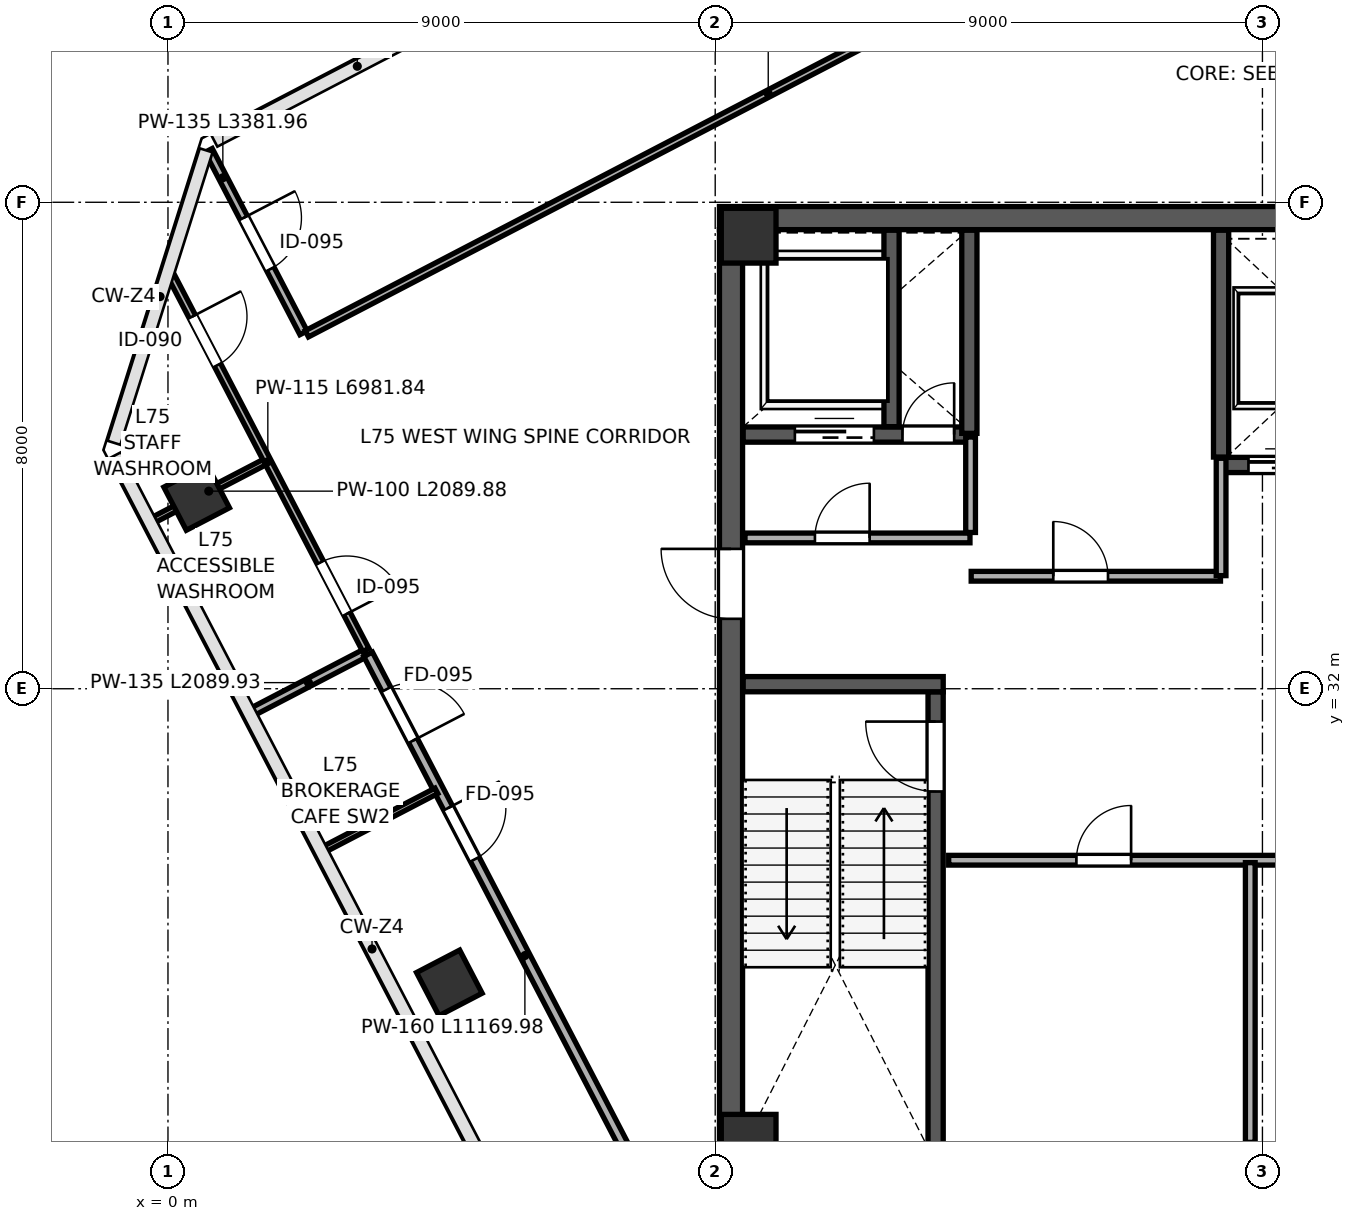
"""IFC4 building model, lengths in metres.
Left out: names, types, materials, properties, quantities, classifications, styles, units other than length and angle.
Written with IfcOpenShell. Run it as: python <this file> out.ifc"""

import sys

from ifc_helpers import new_model, si_unit, direction, frame, frame_2d, origin, origin_2d, place, context, subcontext, project, spatial, rectangle, extrude, source, transform, mapped, element, fill, save


model = new_model("IFC4")
c1 = context("Model", 3, precision=1e-05, world=origin(), true_north=direction((0.0, 1.0)))
c2 = subcontext(c1, "Body", "Model", "MODEL_VIEW")
j1 = project(units=[si_unit("LENGTHUNIT", "METRE"), si_unit("PLANEANGLEUNIT", "RADIAN")], contexts=[c1])
p1 = place(None, origin())
s1 = spatial("IfcSite", under=j1, at=p1, CompositionType="ELEMENT")
p2 = place(p1, origin())
s2 = spatial("IfcBuilding", under=s1, at=p2, CompositionType="ELEMENT")
p3 = place(p2, frame((0.0, 0.0, 332.4)))
s3 = spatial("IfcBuildingStorey", under=s2, at=p3, CompositionType="ELEMENT", Elevation=332.4)
m1 = source(origin(), c2, "Body", "SweptSolid", [
    extrude(rectangle(XDim=0.9, YDim=0.9, at=origin_2d()), origin(), (0.0, 0.0, 1.0), 4.199),
])
for number, where, z_axis, x_axis in (
    (1, (9.55, 24.55, 0.001), (0.0, 0.0, 1.0), (1.0, 0.0, 0.0)),
    (2, (9.55, 39.45, 0.001), (0.0, 0.0, 1.0), (1.0, 0.0, 0.0)),
):
    element("IfcColumn", number, at=place(p3, frame(where, z_axis=z_axis, x_axis=x_axis)), inside=s3, PredefinedType="COLUMN", context=c2, shape_type="MappedRepresentation", body=[
        mapped(m1, transform((0.0, 0.0, 0.0), scale=1.0)),
    ])
m2 = source(origin(), c2, "Body", "SweptSolid", [
    extrude(rectangle(XDim=0.8, YDim=0.8, at=origin_2d()), origin(), (0.0, 0.0, 1.0), 4.199),
])
for number, where, z_axis, x_axis in (
    (3, (0.472, 35.146, 0.001), (0.0, 0.0, 1.0), (-0.462, 0.887, 0.0)),
    (4, (4.627, 27.163, 0.001), (0.0, 0.0, 1.0), (-0.462, 0.887, 0.0)),
):
    element("IfcColumn", number, at=place(p3, frame(where, z_axis=z_axis, x_axis=x_axis)), inside=s3, PredefinedType="COLUMN", context=c2, shape_type="MappedRepresentation", body=[
        mapped(m2, transform((0.0, 0.0, 0.0), scale=1.0)),
    ])
p4 = place(p3, frame((9.26, 24.45, 0.0), z_axis=(0.0, 0.0, 1.0), x_axis=(0.0, 1.0, 0.0)))
e5 = element("IfcWall", 5, at=p4, inside=s3, PredefinedType="SHEAR", context=c2, shape_type="SweptSolid", body=[
    extrude(rectangle(XDim=15.1, YDim=0.38, at=frame_2d((7.55, 0.0))), origin(), (0.0, 0.0, 1.0), 3.96),
])
p5 = place(p4, frame((8.7, 0.0, 0.0)))
e6 = element("IfcOpeningElement", 6, at=p5, cuts=e5, PredefinedType="OPENING", context=c2, shape_type="SweptSolid", body=[
    extrude(rectangle(XDim=1.15, YDim=2.2, at=frame_2d((0.575, 1.1))), frame((0.0, 0.2, 0.0), z_axis=(0.0, -1.0, 0.0), x_axis=(1.0, 0.0, 0.0)), (0.0, 0.0, 1.0), 0.4),
])
p6 = place(p3, frame((9.07, 39.74, 0.0), z_axis=(0.0, 0.0, 1.0), x_axis=(1.0, 0.0, 0.0)))
e7 = element("IfcWall", 7, at=p6, inside=s3, PredefinedType="SHEAR", context=c2, shape_type="SweptSolid", body=[
    extrude(rectangle(XDim=17.86, YDim=0.38, at=frame_2d((8.93, 0.0))), origin(), (0.0, 0.0, 1.0), 3.96),
])
p7 = place(p3, frame((12.625, 24.46, 0.0), z_axis=(0.0, 0.0, 1.0), x_axis=(0.0, 1.0, 0.0)))
e8 = element("IfcWall", 8, at=p7, inside=s3, PredefinedType="SHEAR", context=c2, shape_type="SweptSolid", body=[
    extrude(rectangle(XDim=7.49, YDim=0.25, at=frame_2d((3.745, 0.0))), origin(), (0.0, 0.0, 1.0), 3.96),
])
p8 = place(p7, frame((5.85, 0.0, 0.0)))
e9 = element("IfcOpeningElement", 9, at=p8, cuts=e8, PredefinedType="OPENING", context=c2, shape_type="SweptSolid", body=[
    extrude(rectangle(XDim=1.15, YDim=2.2, at=frame_2d((0.575, 1.1))), frame((0.0, 0.135, 0.0), z_axis=(0.0, -1.0, 0.0), x_axis=(1.0, 0.0, 0.0)), (0.0, 0.0, 1.0), 0.27),
])
p9 = place(p3, frame((9.46, 32.075, 0.0), z_axis=(0.0, 0.0, 1.0), x_axis=(1.0, 0.0, 0.0)))
e10 = element("IfcWall", 10, at=p9, inside=s3, PredefinedType="SHEAR", context=c2, shape_type="SweptSolid", body=[
    extrude(rectangle(XDim=3.29, YDim=0.25, at=frame_2d((1.645, 0.0))), origin(), (0.0, 0.0, 1.0), 3.96),
])
p10 = place(p3, frame((9.46, 36.18, 0.0), z_axis=(0.0, 0.0, 1.0), x_axis=(1.0, 0.0, 0.0)))
e11 = element("IfcWall", 11, at=p10, inside=s3, PredefinedType="SHEAR", context=c2, shape_type="SweptSolid", body=[
    extrude(rectangle(XDim=3.79, YDim=0.25, at=frame_2d((1.895, 0.0))), origin(), (0.0, 0.0, 1.0), 3.96),
])
p11 = place(p10, frame((2.62, 0.0, 0.0)))
e12 = element("IfcOpeningElement", 12, at=p11, cuts=e11, PredefinedType="OPENING", context=c2, shape_type="SweptSolid", body=[
    extrude(rectangle(XDim=0.85, YDim=2.1, at=frame_2d((0.425, 1.05))), frame((0.0, 0.135, 0.0), z_axis=(0.0, -1.0, 0.0), x_axis=(1.0, 0.0, 0.0)), (0.0, 0.0, 1.0), 0.27),
])
p12 = place(p10, frame((0.85, 0.0, 0.0)))
e13 = element("IfcOpeningElement", 13, at=p12, cuts=e11, PredefinedType="OPENING", context=c2, shape_type="SweptSolid", body=[
    extrude(rectangle(XDim=1.3, YDim=2.25, at=frame_2d((0.65, 1.125))), frame((0.0, 0.135, 0.0), z_axis=(0.0, -1.0, 0.0), x_axis=(1.0, 0.0, 0.0)), (0.0, 0.0, 1.0), 0.27),
])
p13 = place(p3, frame((11.9, 36.31, 0.0), z_axis=(0.0, 0.0, 1.0), x_axis=(0.0, 1.0, 0.0)))
e14 = element("IfcWall", 14, at=p13, inside=s3, PredefinedType="SHEAR", context=c2, shape_type="SweptSolid", body=[
    extrude(rectangle(XDim=3.23, YDim=0.25, at=frame_2d((1.615, 0.0))), origin(), (0.0, 0.0, 1.0), 3.96),
])
p14 = place(p3, frame((13.18, 36.2, 0.0), z_axis=(0.0, 0.0, 1.0), x_axis=(0.0, 1.0, 0.0)))
e15 = element("IfcWall", 15, at=p14, inside=s3, PredefinedType="SHEAR", context=c2, shape_type="SweptSolid", body=[
    extrude(rectangle(XDim=3.34, YDim=0.25, at=frame_2d((1.67, 0.0))), origin(), (0.0, 0.0, 1.0), 3.96),
])
p15 = place(p3, frame((17.32, 35.68, 0.0), z_axis=(0.0, 0.0, 1.0), x_axis=(1.0, 0.0, 0.0)))
e16 = element("IfcWall", 16, at=p15, inside=s3, PredefinedType="SHEAR", context=c2, shape_type="SweptSolid", body=[
    extrude(rectangle(XDim=3.87, YDim=0.25, at=frame_2d((1.935, 0.0))), origin(), (0.0, 0.0, 1.0), 3.96),
])
p16 = place(p15, frame((0.45, 0.0, 0.0)))
e17 = element("IfcOpeningElement", 17, at=p16, cuts=e16, PredefinedType="OPENING", context=c2, shape_type="SweptSolid", body=[
    extrude(rectangle(XDim=1.1, YDim=2.2, at=frame_2d((0.55, 1.1))), frame((0.0, 0.135, 0.0), z_axis=(0.0, -1.0, 0.0), x_axis=(1.0, 0.0, 0.0)), (0.0, 0.0, 1.0), 0.27),
])
p17 = place(p15, frame((2.35, 0.0, 0.0)))
e18 = element("IfcOpeningElement", 18, at=p17, cuts=e16, PredefinedType="OPENING", context=c2, shape_type="SweptSolid", body=[
    extrude(rectangle(XDim=1.1, YDim=2.2, at=frame_2d((0.55, 1.1))), frame((0.0, 0.135, 0.0), z_axis=(0.0, -1.0, 0.0), x_axis=(1.0, 0.0, 0.0)), (0.0, 0.0, 1.0), 0.27),
])
p18 = place(p3, frame((17.32, 35.81, 0.0), z_axis=(0.0, 0.0, 1.0), x_axis=(0.0, 1.0, 0.0)))
e19 = element("IfcWall", 19, at=p18, inside=s3, PredefinedType="SHEAR", context=c2, shape_type="SweptSolid", body=[
    extrude(rectangle(XDim=3.73, YDim=0.25, at=frame_2d((1.865, 0.0))), origin(), (0.0, 0.0, 1.0), 3.96),
])
p19 = place(p3, frame((9.49, 34.48, 0.0), z_axis=(0.0, 0.0, 1.0), x_axis=(1.0, 0.0, 0.0)))
e20 = element("IfcWall", 20, at=p19, inside=s3, PredefinedType="PARTITIONING", context=c2, shape_type="SweptSolid", body=[
    extrude(rectangle(XDim=3.7, YDim=0.16, at=frame_2d((1.85, 0.0))), origin(), (0.0, 0.0, 1.0), 3.96),
])
p20 = place(p19, frame((1.15, 0.0, 0.0)))
e21 = element("IfcOpeningElement", 21, at=p20, cuts=e20, PredefinedType="OPENING", context=c2, shape_type="SweptSolid", body=[
    extrude(rectangle(XDim=0.9, YDim=2.15, at=frame_2d((0.45, 1.075))), frame((0.0, 0.09, 0.0), z_axis=(0.0, -1.0, 0.0), x_axis=(1.0, 0.0, 0.0)), (0.0, 0.0, 1.0), 0.18),
])
p21 = place(p3, frame((13.2, 34.57, 0.0), z_axis=(0.0, 0.0, 1.0), x_axis=(0.0, 1.0, 0.0)))
e22 = element("IfcWall", 22, at=p21, inside=s3, PredefinedType="PARTITIONING", context=c2, shape_type="SweptSolid", body=[
    extrude(rectangle(XDim=1.57, YDim=0.16, at=frame_2d((0.785, 0.0))), origin(), (0.0, 0.0, 1.0), 3.96),
])
p22 = place(p3, frame((13.21, 33.85, 0.0), z_axis=(0.0, 0.0, 1.0), x_axis=(1.0, 0.0, 0.0)))
e23 = element("IfcWall", 23, at=p22, inside=s3, PredefinedType="PARTITIONING", context=c2, shape_type="SweptSolid", body=[
    extrude(rectangle(XDim=4.1, YDim=0.16, at=frame_2d((2.05, 0.0))), origin(), (0.0, 0.0, 1.0), 3.96),
])
p23 = place(p22, frame((1.35, 0.0, 0.0)))
e24 = element("IfcOpeningElement", 24, at=p23, cuts=e23, PredefinedType="OPENING", context=c2, shape_type="SweptSolid", body=[
    extrude(rectangle(XDim=0.9, YDim=2.15, at=frame_2d((0.45, 1.075))), frame((0.0, 0.09, 0.0), z_axis=(0.0, -1.0, 0.0), x_axis=(1.0, 0.0, 0.0)), (0.0, 0.0, 1.0), 0.18),
])
p24 = place(p3, frame((17.32, 33.86, 0.0), z_axis=(0.0, 0.0, 1.0), x_axis=(0.0, 1.0, 0.0)))
e25 = element("IfcWall", 25, at=p24, inside=s3, PredefinedType="PARTITIONING", context=c2, shape_type="SweptSolid", body=[
    extrude(rectangle(XDim=1.93, YDim=0.16, at=frame_2d((0.965, 0.0))), origin(), (0.0, 0.0, 1.0), 3.96),
])
p25 = place(p3, frame((12.84, 29.18, 0.0), z_axis=(0.0, 0.0, 1.0), x_axis=(1.0, 0.0, 0.0)))
e26 = element("IfcWall", 26, at=p25, inside=s3, PredefinedType="PARTITIONING", context=c2, shape_type="SweptSolid", body=[
    extrude(rectangle(XDim=8.37, YDim=0.16, at=frame_2d((4.185, 0.0))), origin(), (0.0, 0.0, 1.0), 3.96),
])
p26 = place(p25, frame((2.1, 0.0, 0.0)))
e27 = element("IfcOpeningElement", 27, at=p26, cuts=e26, PredefinedType="OPENING", context=c2, shape_type="SweptSolid", body=[
    extrude(rectangle(XDim=0.9, YDim=2.15, at=frame_2d((0.45, 1.075))), frame((0.0, 0.09, 0.0), z_axis=(0.0, -1.0, 0.0), x_axis=(1.0, 0.0, 0.0)), (0.0, 0.0, 1.0), 0.18),
])
p27 = place(p25, frame((6.2, 0.0, 0.0)))
e28 = element("IfcOpeningElement", 28, at=p27, cuts=e26, PredefinedType="OPENING", context=c2, shape_type="SweptSolid", body=[
    extrude(rectangle(XDim=0.85, YDim=2.1, at=frame_2d((0.425, 1.05))), frame((0.0, 0.09, 0.0), z_axis=(0.0, -1.0, 0.0), x_axis=(1.0, 0.0, 0.0)), (0.0, 0.0, 1.0), 0.18),
])
p28 = place(p3, frame((17.8, 24.54, 0.0), z_axis=(0.0, 0.0, 1.0), x_axis=(0.0, 1.0, 0.0)))
e29 = element("IfcWall", 29, at=p28, inside=s3, PredefinedType="PARTITIONING", context=c2, shape_type="SweptSolid", body=[
    extrude(rectangle(XDim=4.6, YDim=0.16, at=frame_2d((2.3, 0.0))), origin(), (0.0, 0.0, 1.0), 3.96),
])
p29 = place(p3, frame((-0.256, 34.767, 0.0), z_axis=(0.0, 0.0, 1.0), x_axis=(0.887042679543, 0.461687431786, 0.0)))
e30 = element("IfcWall", 30, at=p29, inside=s3, PredefinedType="PARTITIONING", context=c2, shape_type="SweptSolid", body=[
    extrude(rectangle(XDim=2.09, YDim=0.1, at=frame_2d((1.045, 0.0))), origin(), (0.0, 0.0, 1.0), 3.295),
])
p30 = place(p3, frame((1.383, 31.618, 0.0), z_axis=(0.0, 0.0, 1.0), x_axis=(0.887067577271, 0.461639592491, 0.0)))
e31 = element("IfcWall", 31, at=p30, inside=s3, PredefinedType="PARTITIONING", context=c2, shape_type="SweptSolid", body=[
    extrude(rectangle(XDim=2.09, YDim=0.135, at=frame_2d((1.045, 0.0))), origin(), (0.0, 0.0, 1.0), 3.295),
])
p31 = place(p3, frame((0.031, 38.83, 0.0), z_axis=(0.0, 0.0, 1.0), x_axis=(0.461729249278, -0.887020913147, 0.0)))
e32 = element("IfcWall", 32, at=p31, inside=s3, PredefinedType="PARTITIONING", context=c2, shape_type="SweptSolid", body=[
    extrude(rectangle(XDim=6.982, YDim=0.115, at=frame_2d((3.491, 0.0))), origin(), (0.0, 0.0, 1.0), 3.96),
])
p32 = place(p31, frame((0.8, 0.0, 0.0)))
e33 = element("IfcOpeningElement", 33, at=p32, cuts=e32, PredefinedType="OPENING", context=c2, shape_type="SweptSolid", body=[
    extrude(rectangle(XDim=0.9, YDim=2.15, at=frame_2d((0.45, 1.075))), frame((0.0, 0.067, 0.0), z_axis=(0.0, -1.0, 0.0), x_axis=(1.0, 0.0, 0.0)), (0.0, 0.0, 1.0), 0.135),
])
p33 = place(p31, frame((5.36, 0.0, 0.0)))
e34 = element("IfcOpeningElement", 34, at=p33, cuts=e32, PredefinedType="OPENING", context=c2, shape_type="SweptSolid", body=[
    extrude(rectangle(XDim=0.95, YDim=2.15, at=frame_2d((0.475, 1.075))), frame((0.0, 0.067, 0.0), z_axis=(0.0, -1.0, 0.0), x_axis=(1.0, 0.0, 0.0)), (0.0, 0.0, 1.0), 0.135),
])
p34 = place(p3, frame((3.291, 32.566, 0.0), z_axis=(0.0, 0.0, 1.0), x_axis=(0.461745644878, -0.887012378401, 0.0)))
e35 = element("IfcWall", 35, at=p34, inside=s3, PredefinedType="PARTITIONING", context=c2, shape_type="SweptSolid", body=[
    extrude(rectangle(XDim=11.17, YDim=0.16, at=frame_2d((5.585, 0.0))), origin(), (0.0, 0.0, 1.0), 3.96),
])
p35 = place(p34, frame((0.65, 0.0, 0.0)))
e36 = element("IfcOpeningElement", 36, at=p35, cuts=e35, PredefinedType="OPENING", context=c2, shape_type="SweptSolid", body=[
    extrude(rectangle(XDim=0.95, YDim=2.15, at=frame_2d((0.475, 1.075))), frame((0.0, 0.09, 0.0), z_axis=(0.0, -1.0, 0.0), x_axis=(1.0, 0.0, 0.0)), (0.0, 0.0, 1.0), 0.18),
])
p36 = place(p34, frame((2.85, 0.0, 0.0)))
e37 = element("IfcOpeningElement", 37, at=p36, cuts=e35, PredefinedType="OPENING", context=c2, shape_type="SweptSolid", body=[
    extrude(rectangle(XDim=0.95, YDim=2.15, at=frame_2d((0.475, 1.075))), frame((0.0, 0.09, 0.0), z_axis=(0.0, -1.0, 0.0), x_axis=(1.0, 0.0, 0.0)), (0.0, 0.0, 1.0), 0.18),
])
p37 = place(p3, frame((2.561, 29.356, 0.0), z_axis=(0.0, 0.0, 1.0), x_axis=(0.887019740079, 0.461731502835, 0.0)))
e38 = element("IfcWall", 38, at=p37, inside=s3, PredefinedType="PARTITIONING", context=c2, shape_type="SweptSolid", body=[
    extrude(rectangle(XDim=2.09, YDim=0.1, at=frame_2d((1.045, 0.0))), origin(), (0.0, 0.0, 1.0), 3.295),
])
p38 = place(p3, frame((0.668, 40.853, 0.0), z_axis=(0.0, 0.0, 1.0), x_axis=(0.461736835827, -0.887016964009, 0.0)))
e39 = element("IfcWall", 39, at=p38, inside=s3, PredefinedType="PARTITIONING", context=c2, shape_type="SweptSolid", body=[
    extrude(rectangle(XDim=3.382, YDim=0.135, at=frame_2d((1.691, 0.0))), origin(), (0.0, 0.0, 1.0), 3.96),
])
p39 = place(p38, frame((1.25, 0.0, 0.0)))
e40 = element("IfcOpeningElement", 40, at=p39, cuts=e39, PredefinedType="OPENING", context=c2, shape_type="SweptSolid", body=[
    extrude(rectangle(XDim=0.95, YDim=2.15, at=frame_2d((0.475, 1.075))), frame((0.0, 0.078, 0.0), z_axis=(0.0, -1.0, 0.0), x_axis=(1.0, 0.0, 0.0)), (0.0, 0.0, 1.0), 0.155),
])
p40 = place(p3, frame((2.284, 37.836, 0.0), z_axis=(0.0, 0.0, 1.0), x_axis=(0.887016973522, 0.461736817553, 0.0)))
e41 = element("IfcWall", 41, at=p40, inside=s3, PredefinedType="PARTITIONING", context=c2, shape_type="SweptSolid", body=[
    extrude(rectangle(XDim=17.11, YDim=0.115, at=frame_2d((8.555, 0.0))), origin(), (0.0, 0.0, 1.0), 3.96),
])
m3 = source(origin(), c2, "Body", "SweptSolid", [
    extrude(rectangle(XDim=1.15, YDim=2.2, at=frame_2d((0.575, 1.1))), frame((0.0, 0.025, 0.0), z_axis=(0.0, -1.0, 0.0), x_axis=(1.0, 0.0, 0.0)), (0.0, 0.0, 1.0), 0.05),
])
p41 = place(p8, origin())
e42 = element("IfcDoor", 42, at=p41, inside=s3, OperationType="SINGLE_SWING_RIGHT", PredefinedType="DOOR", context=c2, shape_type="MappedRepresentation", body=[
    mapped(m3, transform((0.0, 0.0, 0.0), scale=1.0)),
])
fill(e9, e42)
m4 = source(origin(), c2, "Body", "SweptSolid", [
    extrude(rectangle(XDim=1.15, YDim=2.2, at=frame_2d((0.575, 1.1))), frame((0.0, 0.025, 0.0), z_axis=(0.0, -1.0, 0.0), x_axis=(1.0, 0.0, 0.0)), (0.0, 0.0, 1.0), 0.05),
])
p42 = place(p5, origin())
e43 = element("IfcDoor", 43, at=p42, inside=s3, OperationType="SINGLE_SWING_RIGHT", PredefinedType="DOOR", context=c2, shape_type="MappedRepresentation", body=[
    mapped(m4, transform((0.0, 0.0, 0.0), scale=1.0)),
])
fill(e6, e43)
m5 = source(origin(), c2, "Body", "SweptSolid", [
    extrude(rectangle(XDim=0.85, YDim=2.1, at=frame_2d((0.425, 1.05))), frame((0.0, 0.025, 0.0), z_axis=(0.0, -1.0, 0.0), x_axis=(1.0, 0.0, 0.0)), (0.0, 0.0, 1.0), 0.05),
])
p43 = place(p11, origin())
e44 = element("IfcDoor", 44, at=p43, inside=s3, OperationType="SINGLE_SWING_RIGHT", PredefinedType="DOOR", context=c2, shape_type="MappedRepresentation", body=[
    mapped(m5, transform((0.0, 0.0, 0.0), scale=1.0)),
])
fill(e12, e44)
m6 = source(origin(), c2, "Body", "SweptSolid", [
    extrude(rectangle(XDim=1.1, YDim=2.2, at=frame_2d((0.55, 1.1))), frame((0.0, 0.025, 0.0), z_axis=(0.0, -1.0, 0.0), x_axis=(1.0, 0.0, 0.0)), (0.0, 0.0, 1.0), 0.05),
])
p44 = place(p16, origin())
e45 = element("IfcDoor", 45, at=p44, inside=s3, OperationType="SLIDING_TO_LEFT", PredefinedType="DOOR", context=c2, shape_type="MappedRepresentation", body=[
    mapped(m6, transform((0.0, 0.0, 0.0), scale=1.0)),
])
fill(e17, e45)
m7 = source(origin(), c2, "Body", "SweptSolid", [
    extrude(rectangle(XDim=1.3, YDim=2.25, at=frame_2d((0.65, 1.125))), frame((0.0, 0.025, 0.0), z_axis=(0.0, -1.0, 0.0), x_axis=(1.0, 0.0, 0.0)), (0.0, 0.0, 1.0), 0.05),
])
p45 = place(p12, origin())
e46 = element("IfcDoor", 46, at=p45, inside=s3, OperationType="SLIDING_TO_LEFT", PredefinedType="DOOR", context=c2, shape_type="MappedRepresentation", body=[
    mapped(m7, transform((0.0, 0.0, 0.0), scale=1.0)),
])
fill(e13, e46)
m8 = source(origin(), c2, "Body", "SweptSolid", [
    extrude(rectangle(XDim=0.9, YDim=2.15, at=frame_2d((0.45, 1.075))), frame((0.0, 0.025, 0.0), z_axis=(0.0, -1.0, 0.0), x_axis=(1.0, 0.0, 0.0)), (0.0, 0.0, 1.0), 0.05),
])
p46 = place(p20, origin())
e47 = element("IfcDoor", 47, at=p46, inside=s3, OperationType="SINGLE_SWING_RIGHT", PredefinedType="DOOR", context=c2, shape_type="MappedRepresentation", body=[
    mapped(m8, transform((0.0, 0.0, 0.0), scale=1.0)),
])
fill(e21, e47)
p47 = place(p23, origin())
e48 = element("IfcDoor", 48, at=p47, inside=s3, OperationType="SINGLE_SWING_LEFT", PredefinedType="DOOR", context=c2, shape_type="MappedRepresentation", body=[
    mapped(m8, transform((0.0, 0.0, 0.0), scale=1.0)),
])
fill(e24, e48)
p48 = place(p26, origin())
e49 = element("IfcDoor", 49, at=p48, inside=s3, OperationType="SINGLE_SWING_RIGHT", PredefinedType="DOOR", context=c2, shape_type="MappedRepresentation", body=[
    mapped(m8, transform((0.0, 0.0, 0.0), scale=1.0)),
])
fill(e27, e49)
m9 = source(origin(), c2, "Body", "SweptSolid", [
    extrude(rectangle(XDim=0.9, YDim=2.15, at=frame_2d((0.45, 1.075))), frame((0.0, 0.025, 0.0), z_axis=(0.0, -1.0, 0.0), x_axis=(1.0, 0.0, 0.0)), (0.0, 0.0, 1.0), 0.05),
])
p49 = place(p32, origin())
e50 = element("IfcDoor", 50, at=p49, inside=s3, OperationType="SINGLE_SWING_LEFT", PredefinedType="DOOR", context=c2, shape_type="MappedRepresentation", body=[
    mapped(m9, transform((0.0, 0.0, 0.0), scale=1.0)),
])
fill(e33, e50)
m10 = source(origin(), c2, "Body", "SweptSolid", [
    extrude(rectangle(XDim=0.95, YDim=2.15, at=frame_2d((0.475, 1.075))), frame((0.0, 0.025, 0.0), z_axis=(0.0, -1.0, 0.0), x_axis=(1.0, 0.0, 0.0)), (0.0, 0.0, 1.0), 0.05),
])
p50 = place(p33, origin())
e51 = element("IfcDoor", 51, at=p50, inside=s3, OperationType="SINGLE_SWING_RIGHT", PredefinedType="DOOR", context=c2, shape_type="MappedRepresentation", body=[
    mapped(m10, transform((0.0, 0.0, 0.0), scale=1.0)),
])
fill(e34, e51)
m11 = source(origin(), c2, "Body", "SweptSolid", [
    extrude(rectangle(XDim=0.95, YDim=2.15, at=frame_2d((0.475, 1.075))), frame((0.0, 0.025, 0.0), z_axis=(0.0, -1.0, 0.0), x_axis=(1.0, 0.0, 0.0)), (0.0, 0.0, 1.0), 0.05),
])
p51 = place(p35, origin())
e52 = element("IfcDoor", 52, at=p51, inside=s3, OperationType="SINGLE_SWING_RIGHT", PredefinedType="DOOR", context=c2, shape_type="MappedRepresentation", body=[
    mapped(m11, transform((0.0, 0.0, 0.0), scale=1.0)),
])
fill(e36, e52)
p52 = place(p36, origin())
e53 = element("IfcDoor", 53, at=p52, inside=s3, OperationType="SINGLE_SWING_LEFT", PredefinedType="DOOR", context=c2, shape_type="MappedRepresentation", body=[
    mapped(m11, transform((0.0, 0.0, 0.0), scale=1.0)),
])
fill(e37, e53)
p53 = place(p39, origin())
e54 = element("IfcDoor", 54, at=p53, inside=s3, OperationType="SINGLE_SWING_LEFT", PredefinedType="DOOR", context=c2, shape_type="MappedRepresentation", body=[
    mapped(m10, transform((0.0, 0.0, 0.0), scale=1.0)),
])
fill(e40, e54)
save(model, sys.argv[1])
